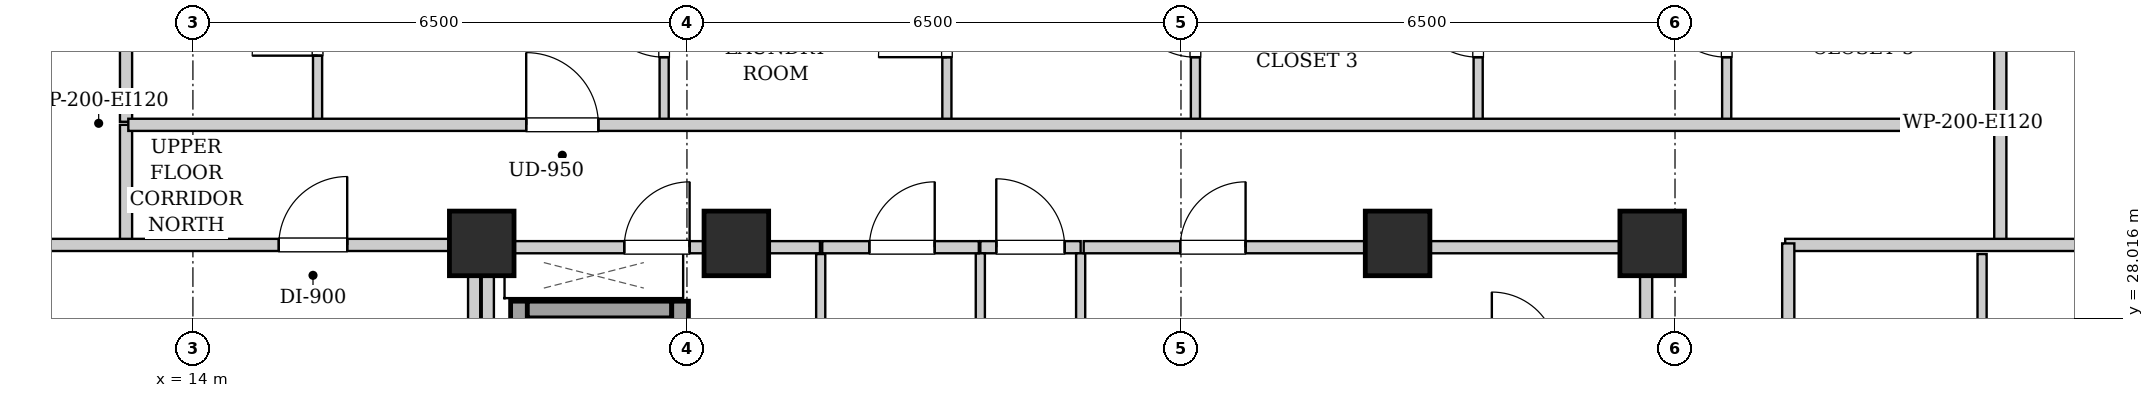
"""IFC4 building model, lengths in metres.
Left out: names, types, materials, properties, quantities, classifications, styles, units other than length and angle.
Written with IfcOpenShell. Run it as: python <this file> out.ifc"""

import sys

from ifc_helpers import new_model, si_unit, direction, frame, frame_2d, origin, origin_2d, place, context, subcontext, project, spatial, rectangle, extrude, element, fill, save


model = new_model("IFC4")
c1 = context("Model", 3, precision=1e-05, world=origin(), true_north=direction((0.0, 1.0)))
c2 = subcontext(c1, "Body", "Model", "MODEL_VIEW")
j1 = project(units=[si_unit("LENGTHUNIT", "METRE"), si_unit("PLANEANGLEUNIT", "RADIAN")], contexts=[c1])
p1 = place(None, origin())
s1 = spatial("IfcSite", under=j1, at=p1, CompositionType="ELEMENT")
p2 = place(p1, origin())
s2 = spatial("IfcBuilding", under=s1, at=p2, CompositionType="ELEMENT")
p3 = place(p2, frame((0.0, 0.0, 181.0)))
s3 = spatial("IfcBuildingStorey", under=s2, at=p3, CompositionType="ELEMENT", Elevation=181.0)
for number, where, z_axis, x_axis in (
    (1, (17.8, 29.0, 0.0), (0.0, 0.0, 1.0), (1.0, 0.0, 0.0)),
    (2, (21.15, 29.0, 0.0), (0.0, 0.0, 1.0), (1.0, 0.0, 0.0)),
    (3, (29.85, 29.0, 0.0), (0.0, 0.0, 1.0), (1.0, 0.0, 0.0)),
    (4, (33.2, 29.0, 0.0), (0.0, 0.0, 1.0), (1.0, 0.0, 0.0)),
):
    element("IfcColumn", number, at=place(p3, frame(where, z_axis=z_axis, x_axis=x_axis)), inside=s3, PredefinedType="COLUMN", context=c2, shape_type="SweptSolid", body=[
        extrude(rectangle(XDim=0.85, YDim=0.85, at=origin_2d()), origin(), (0.0, 0.0, 1.0), 3.3),
    ])
p4 = place(p3, frame((18.29, 24.1, 0.0), z_axis=(0.0, 0.0, 1.0), x_axis=(0.0, 1.0, 0.0)))
e5 = element("IfcWall", 5, at=p4, inside=s3, PredefinedType="SHEAR", context=c2, shape_type="SweptSolid", body=[
    extrude(rectangle(XDim=4.14, YDim=0.22, at=frame_2d((2.07, 0.0))), origin(), (0.0, 0.0, 1.0), 3.04),
])
p5 = place(p3, frame((18.4, 28.13, 0.0), z_axis=(0.0, 0.0, 1.0), x_axis=(1.0, 0.0, 0.0)))
e6 = element("IfcWall", 6, at=p5, inside=s3, PredefinedType="SHEAR", context=c2, shape_type="SweptSolid", body=[
    extrude(rectangle(XDim=1.9, YDim=0.22, at=frame_2d((0.95, 0.0))), origin(), (0.0, 0.0, 1.0), 3.04),
])
p6 = place(p3, frame((20.41, 26.06, 0.0), z_axis=(0.0, 0.0, 1.0), x_axis=(0.0, 1.0, 0.0)))
e7 = element("IfcWall", 7, at=p6, inside=s3, PredefinedType="SHEAR", context=c2, shape_type="SweptSolid", body=[
    extrude(rectangle(XDim=2.18, YDim=0.22, at=frame_2d((1.09, 0.0))), origin(), (0.0, 0.0, 1.0), 3.04),
])
p7 = place(p6, frame((0.54, 0.0, 0.0)))
e8 = element("IfcOpeningElement", 8, at=p7, cuts=e7, PredefinedType="OPENING", context=c2, shape_type="SweptSolid", body=[
    extrude(rectangle(XDim=1.1, YDim=2.15, at=frame_2d((0.55, 1.075))), frame((0.0, 0.12, 0.0), z_axis=(0.0, -1.0, 0.0), x_axis=(1.0, 0.0, 0.0)), (0.0, 0.0, 1.0), 0.24),
])
for number, where, z_axis, x_axis in (
    (9, (17.88, 24.12, 0.0), (0.0, 0.0, 1.0), (0.0, 1.0, 0.0)),
    (10, (33.12, 24.12, 0.0), (0.0, 0.0, 1.0), (0.0, 1.0, 0.0)),
):
    element("IfcWall", number, at=place(p3, frame(where, z_axis=z_axis, x_axis=x_axis)), inside=s3, PredefinedType="PARTITIONING", context=c2, shape_type="SweptSolid", body=[
        extrude(rectangle(XDim=4.76, YDim=0.16, at=frame_2d((2.38, 0.0))), origin(), (0.0, 0.0, 1.0), 3.04),
    ])
p8 = place(p3, frame((24.36, 28.95, 0.0), z_axis=(0.0, 0.0, 1.0), x_axis=(1.0, 0.0, 0.0)))
e11 = element("IfcWall", 11, at=p8, inside=s3, PredefinedType="PARTITIONING", context=c2, shape_type="SweptSolid", body=[
    extrude(rectangle(XDim=1.32, YDim=0.16, at=frame_2d((0.66, 0.0))), origin(), (0.0, 0.0, 1.0), 2.556),
])
p9 = place(p8, frame((0.21, 0.0, 0.0)))
e12 = element("IfcOpeningElement", 12, at=p9, cuts=e11, PredefinedType="OPENING", context=c2, shape_type="SweptSolid", body=[
    extrude(rectangle(XDim=0.9, YDim=2.05, at=frame_2d((0.45, 1.025))), frame((0.0, 0.09, 0.0), z_axis=(0.0, -1.0, 0.0), x_axis=(1.0, 0.0, 0.0)), (0.0, 0.0, 1.0), 0.18),
])
p10 = place(p3, frame((17.96, 28.95, 0.0), z_axis=(0.0, 0.0, 1.0), x_axis=(1.0, 0.0, 0.0)))
e13 = element("IfcWall", 13, at=p10, inside=s3, PredefinedType="PARTITIONING", context=c2, shape_type="SweptSolid", body=[
    extrude(rectangle(XDim=4.29, YDim=0.16, at=frame_2d((2.145, 0.0))), origin(), (0.0, 0.0, 1.0), 2.556),
])
p11 = place(p10, frame((1.715, 0.0, 0.0)))
e14 = element("IfcOpeningElement", 14, at=p11, cuts=e13, PredefinedType="OPENING", context=c2, shape_type="SweptSolid", body=[
    extrude(rectangle(XDim=0.86, YDim=2.05, at=frame_2d((0.43, 1.025))), frame((0.0, 0.09, 0.0), z_axis=(0.0, -1.0, 0.0), x_axis=(1.0, 0.0, 0.0)), (0.0, 0.0, 1.0), 0.18),
])
for number, where, z_axis, x_axis in (
    (15, (24.36, 25.0, 0.0), (0.0, 0.0, 1.0), (0.0, 1.0, 0.0)),
    (16, (25.68, 25.0, 0.0), (0.0, 0.0, 1.0), (0.0, 1.0, 0.0)),
):
    element("IfcWall", number, at=place(p3, frame(where, z_axis=z_axis, x_axis=x_axis)), inside=s3, PredefinedType="PARTITIONING", context=c2, shape_type="SweptSolid", body=[
        extrude(rectangle(XDim=3.87, YDim=0.12, at=frame_2d((1.935, 0.0))), origin(), (0.0, 0.0, 1.0), 3.04),
    ])
p12 = place(p3, frame((22.26, 25.0, 0.0), z_axis=(0.0, 0.0, 1.0), x_axis=(0.0, 1.0, 0.0)))
e17 = element("IfcWall", 17, at=p12, inside=s3, PredefinedType="PARTITIONING", context=c2, shape_type="SweptSolid", body=[
    extrude(rectangle(XDim=3.86, YDim=0.12, at=frame_2d((1.93, 0.0))), origin(), (0.0, 0.0, 1.0), 3.04),
])
p13 = place(p3, frame((22.28, 28.95, 0.0), z_axis=(0.0, 0.0, 1.0), x_axis=(1.0, 0.0, 0.0)))
e18 = element("IfcWall", 18, at=p13, inside=s3, PredefinedType="PARTITIONING", context=c2, shape_type="SweptSolid", body=[
    extrude(rectangle(XDim=2.06, YDim=0.16, at=frame_2d((1.03, 0.0))), origin(), (0.0, 0.0, 1.0), 2.556),
])
p14 = place(p13, frame((0.62, 0.0, 0.0)))
e19 = element("IfcOpeningElement", 19, at=p14, cuts=e18, PredefinedType="OPENING", context=c2, shape_type="SweptSolid", body=[
    extrude(rectangle(XDim=0.86, YDim=2.05, at=frame_2d((0.43, 1.025))), frame((0.0, 0.09, 0.0), z_axis=(0.0, -1.0, 0.0), x_axis=(1.0, 0.0, 0.0)), (0.0, 0.0, 1.0), 0.18),
])
p15 = place(p3, frame((25.72, 28.95, 0.0), z_axis=(0.0, 0.0, 1.0), x_axis=(1.0, 0.0, 0.0)))
e20 = element("IfcWall", 20, at=p15, inside=s3, PredefinedType="PARTITIONING", context=c2, shape_type="SweptSolid", body=[
    extrude(rectangle(XDim=7.32, YDim=0.16, at=frame_2d((3.66, 0.0))), origin(), (0.0, 0.0, 1.0), 2.556),
])
p16 = place(p15, frame((1.27, 0.0, 0.0)))
e21 = element("IfcOpeningElement", 21, at=p16, cuts=e20, PredefinedType="OPENING", context=c2, shape_type="SweptSolid", body=[
    extrude(rectangle(XDim=0.86, YDim=2.05, at=frame_2d((0.43, 1.025))), frame((0.0, 0.09, 0.0), z_axis=(0.0, -1.0, 0.0), x_axis=(1.0, 0.0, 0.0)), (0.0, 0.0, 1.0), 0.18),
])
for number, where, z_axis, x_axis in (
    (22, (13.12, 28.98, 0.0), (0.0, 0.0, 1.0), (0.0, 1.0, 0.0)),
    (23, (37.78, 28.98, 0.0), (0.0, 0.0, 1.0), (0.0, 1.0, 0.0)),
):
    element("IfcWall", number, at=place(p3, frame(where, z_axis=z_axis, x_axis=x_axis)), inside=s3, PredefinedType="PARTITIONING", context=c2, shape_type="SweptSolid", body=[
        extrude(rectangle(XDim=1.58, YDim=0.16, at=frame_2d((0.79, 0.0))), origin(), (0.0, 0.0, 1.0), 3.04),
    ])
p17 = place(p3, frame((10.88, 28.98, 0.0), z_axis=(0.0, 0.0, 1.0), x_axis=(1.0, 0.0, 0.0)))
e24 = element("IfcWall", 24, at=p17, inside=s3, PredefinedType="PARTITIONING", context=c2, shape_type="SweptSolid", body=[
    extrude(rectangle(XDim=6.88, YDim=0.16, at=frame_2d((3.44, 0.0))), origin(), (0.0, 0.0, 1.0), 2.556),
])
p18 = place(p17, frame((4.25, 0.0, 0.0)))
e25 = element("IfcOpeningElement", 25, at=p18, cuts=e24, PredefinedType="OPENING", context=c2, shape_type="SweptSolid", body=[
    extrude(rectangle(XDim=0.9, YDim=2.05, at=frame_2d((0.45, 1.025))), frame((0.0, 0.09, 0.0), z_axis=(0.0, -1.0, 0.0), x_axis=(1.0, 0.0, 0.0)), (0.0, 0.0, 1.0), 0.18),
])
p19 = place(p3, frame((34.95, 28.98, 0.0), z_axis=(0.0, 0.0, 1.0), x_axis=(1.0, 0.0, 0.0)))
e26 = element("IfcWall", 26, at=p19, inside=s3, PredefinedType="PARTITIONING", context=c2, shape_type="SweptSolid", body=[
    extrude(rectangle(XDim=5.07, YDim=0.16, at=frame_2d((2.535, 0.0))), origin(), (0.0, 0.0, 1.0), 2.556),
])
for number, where, z_axis, x_axis in (
    (27, (13.12, 30.6, 0.0), (0.0, 0.0, 1.0), (0.0, 1.0, 0.0)),
    (28, (37.78, 30.6, 0.0), (0.0, 0.0, 1.0), (0.0, 1.0, 0.0)),
):
    element("IfcWall", number, at=place(p3, frame(where, z_axis=z_axis, x_axis=x_axis)), inside=s3, PredefinedType="PARTITIONING", context=c2, shape_type="SweptSolid", body=[
        extrude(rectangle(XDim=2.66, YDim=0.16, at=frame_2d((1.33, 0.0))), origin(), (0.0, 0.0, 1.0), 3.04),
    ])
p20 = place(p3, frame((15.64, 30.6, 0.0), z_axis=(0.0, 0.0, 1.0), x_axis=(0.0, 1.0, 0.0)))
e29 = element("IfcWall", 29, at=p20, inside=s3, PredefinedType="PARTITIONING", context=c2, shape_type="SweptSolid", body=[
    extrude(rectangle(XDim=2.6, YDim=0.12, at=frame_2d((1.3, 0.0))), origin(), (0.0, 0.0, 1.0), 3.04),
])
p21 = place(p20, frame((0.87, 0.0, 0.0)))
e30 = element("IfcOpeningElement", 30, at=p21, cuts=e29, PredefinedType="OPENING", context=c2, shape_type="SweptSolid", body=[
    extrude(rectangle(XDim=0.86, YDim=2.05, at=frame_2d((0.43, 1.025))), frame((0.0, 0.07, 0.0), z_axis=(0.0, -1.0, 0.0), x_axis=(1.0, 0.0, 0.0)), (0.0, 0.0, 1.0), 0.14),
])
p22 = place(p3, frame((20.2, 30.6, 0.0), z_axis=(0.0, 0.0, 1.0), x_axis=(0.0, 1.0, 0.0)))
e31 = element("IfcWall", 31, at=p22, inside=s3, PredefinedType="PARTITIONING", context=c2, shape_type="SweptSolid", body=[
    extrude(rectangle(XDim=2.6, YDim=0.12, at=frame_2d((1.3, 0.0))), origin(), (0.0, 0.0, 1.0), 3.04),
])
p23 = place(p22, frame((0.85, 0.0, 0.0)))
e32 = element("IfcOpeningElement", 32, at=p23, cuts=e31, PredefinedType="OPENING", context=c2, shape_type="SweptSolid", body=[
    extrude(rectangle(XDim=0.9, YDim=2.05, at=frame_2d((0.45, 1.025))), frame((0.0, 0.07, 0.0), z_axis=(0.0, -1.0, 0.0), x_axis=(1.0, 0.0, 0.0)), (0.0, 0.0, 1.0), 0.14),
])
p24 = place(p3, frame((23.92, 30.6, 0.0), z_axis=(0.0, 0.0, 1.0), x_axis=(0.0, 1.0, 0.0)))
e33 = element("IfcWall", 33, at=p24, inside=s3, PredefinedType="PARTITIONING", context=c2, shape_type="SweptSolid", body=[
    extrude(rectangle(XDim=2.6, YDim=0.12, at=frame_2d((1.3, 0.0))), origin(), (0.0, 0.0, 1.0), 3.04),
])
p25 = place(p24, frame((0.85, 0.0, 0.0)))
e34 = element("IfcOpeningElement", 34, at=p25, cuts=e33, PredefinedType="OPENING", context=c2, shape_type="SweptSolid", body=[
    extrude(rectangle(XDim=0.9, YDim=2.05, at=frame_2d((0.45, 1.025))), frame((0.0, 0.07, 0.0), z_axis=(0.0, -1.0, 0.0), x_axis=(1.0, 0.0, 0.0)), (0.0, 0.0, 1.0), 0.14),
])
p26 = place(p3, frame((27.19, 30.6, 0.0), z_axis=(0.0, 0.0, 1.0), x_axis=(0.0, 1.0, 0.0)))
e35 = element("IfcWall", 35, at=p26, inside=s3, PredefinedType="PARTITIONING", context=c2, shape_type="SweptSolid", body=[
    extrude(rectangle(XDim=2.6, YDim=0.12, at=frame_2d((1.3, 0.0))), origin(), (0.0, 0.0, 1.0), 3.04),
])
p27 = place(p26, frame((0.85, 0.0, 0.0)))
e36 = element("IfcOpeningElement", 36, at=p27, cuts=e35, PredefinedType="OPENING", context=c2, shape_type="SweptSolid", body=[
    extrude(rectangle(XDim=0.9, YDim=2.05, at=frame_2d((0.45, 1.025))), frame((0.0, 0.07, 0.0), z_axis=(0.0, -1.0, 0.0), x_axis=(1.0, 0.0, 0.0)), (0.0, 0.0, 1.0), 0.14),
])
p28 = place(p3, frame((30.91, 30.6, 0.0), z_axis=(0.0, 0.0, 1.0), x_axis=(0.0, 1.0, 0.0)))
e37 = element("IfcWall", 37, at=p28, inside=s3, PredefinedType="PARTITIONING", context=c2, shape_type="SweptSolid", body=[
    extrude(rectangle(XDim=2.6, YDim=0.12, at=frame_2d((1.3, 0.0))), origin(), (0.0, 0.0, 1.0), 3.04),
])
p29 = place(p28, frame((0.85, 0.0, 0.0)))
e38 = element("IfcOpeningElement", 38, at=p29, cuts=e37, PredefinedType="OPENING", context=c2, shape_type="SweptSolid", body=[
    extrude(rectangle(XDim=0.9, YDim=2.05, at=frame_2d((0.45, 1.025))), frame((0.0, 0.07, 0.0), z_axis=(0.0, -1.0, 0.0), x_axis=(1.0, 0.0, 0.0)), (0.0, 0.0, 1.0), 0.14),
])
p30 = place(p3, frame((34.18, 30.6, 0.0), z_axis=(0.0, 0.0, 1.0), x_axis=(0.0, 1.0, 0.0)))
e39 = element("IfcWall", 39, at=p30, inside=s3, PredefinedType="PARTITIONING", context=c2, shape_type="SweptSolid", body=[
    extrude(rectangle(XDim=2.6, YDim=0.12, at=frame_2d((1.3, 0.0))), origin(), (0.0, 0.0, 1.0), 3.04),
])
p31 = place(p30, frame((0.85, 0.0, 0.0)))
e40 = element("IfcOpeningElement", 40, at=p31, cuts=e39, PredefinedType="OPENING", context=c2, shape_type="SweptSolid", body=[
    extrude(rectangle(XDim=0.9, YDim=2.05, at=frame_2d((0.45, 1.025))), frame((0.0, 0.07, 0.0), z_axis=(0.0, -1.0, 0.0), x_axis=(1.0, 0.0, 0.0)), (0.0, 0.0, 1.0), 0.14),
])
p32 = place(p3, frame((37.54, 24.552, 0.0), z_axis=(0.0, 0.0, 1.0), x_axis=(0.0, 1.0, 0.0)))
e41 = element("IfcWall", 41, at=p32, inside=s3, PredefinedType="PARTITIONING", context=c2, shape_type="SweptSolid", body=[
    extrude(rectangle(XDim=4.308, YDim=0.12, at=frame_2d((2.154, 0.0))), origin(), (0.0, 0.0, 1.0), 3.04),
])
p33 = place(p32, frame((1.704, 0.0, 0.0)))
e42 = element("IfcOpeningElement", 42, at=p33, cuts=e41, PredefinedType="OPENING", context=c2, shape_type="SweptSolid", body=[
    extrude(rectangle(XDim=0.9, YDim=2.05, at=frame_2d((0.45, 1.025))), frame((0.0, 0.07, 0.0), z_axis=(0.0, -1.0, 0.0), x_axis=(1.0, 0.0, 0.0)), (0.0, 0.0, 1.0), 0.14),
])
p34 = place(p3, frame((13.15, 30.56, 0.0), z_axis=(0.0, 0.0, 1.0), x_axis=(1.0, 0.0, 0.0)))
e43 = element("IfcWall", 43, at=p34, inside=s3, PredefinedType="PARTITIONING", context=c2, shape_type="SweptSolid", body=[
    extrude(rectangle(XDim=24.6, YDim=0.16, at=frame_2d((12.3, 0.0))), origin(), (0.0, 0.0, 1.0), 3.04),
])
p35 = place(p34, frame((5.235, 0.0, 0.0)))
e44 = element("IfcOpeningElement", 44, at=p35, cuts=e43, PredefinedType="OPENING", context=c2, shape_type="SweptSolid", body=[
    extrude(rectangle(XDim=0.95, YDim=2.1, at=frame_2d((0.475, 1.05))), frame((0.0, 0.09, 0.0), z_axis=(0.0, -1.0, 0.0), x_axis=(1.0, 0.0, 0.0)), (0.0, 0.0, 1.0), 0.18),
])
p36 = place(p3, frame((17.7, 15.02, 0.0), z_axis=(0.0, 0.0, 1.0), x_axis=(0.0, 1.0, 0.0)))
e45 = element("IfcWall", 45, at=p36, inside=s3, PredefinedType="PARTITIONING", context=c2, shape_type="SweptSolid", body=[
    extrude(rectangle(XDim=13.98, YDim=0.16, at=frame_2d((6.99, 0.0))), origin(), (0.0, 0.0, 1.0), 3.04),
])
p37 = place(p3, frame((34.99, 15.07, 0.0), z_axis=(0.0, 0.0, 1.0), x_axis=(0.0, 1.0, 0.0)))
e46 = element("IfcWall", 46, at=p37, inside=s3, PredefinedType="PARTITIONING", context=c2, shape_type="SweptSolid", body=[
    extrude(rectangle(XDim=13.93, YDim=0.16, at=frame_2d((6.965, 0.0))), origin(), (0.0, 0.0, 1.0), 3.04),
])
p38 = place(p37, frame((4.385, 0.0, 0.0)))
e47 = element("IfcOpeningElement", 47, at=p38, cuts=e46, PredefinedType="OPENING", context=c2, shape_type="SweptSolid", body=[
    extrude(rectangle(XDim=0.95, YDim=2.1, at=frame_2d((0.475, 1.05))), frame((0.0, 0.09, 0.0), z_axis=(0.0, -1.0, 0.0), x_axis=(1.0, 0.0, 0.0)), (0.0, 0.0, 1.0), 0.18),
])
p39 = place(p9, origin())
e48 = element("IfcDoor", 48, at=p39, inside=s3, OperationType="SINGLE_SWING_LEFT", PredefinedType="DOOR", context=c2, shape_type="SweptSolid", body=[
    extrude(rectangle(XDim=0.9, YDim=2.05, at=frame_2d((0.45, 1.025))), frame((0.0, 0.025, 0.0), z_axis=(0.0, -1.0, 0.0), x_axis=(1.0, 0.0, 0.0)), (0.0, 0.0, 1.0), 0.05),
])
fill(e12, e48)
p40 = place(p11, origin())
e49 = element("IfcDoor", 49, at=p40, inside=s3, OperationType="SINGLE_SWING_RIGHT", PredefinedType="DOOR", context=c2, shape_type="SweptSolid", body=[
    extrude(rectangle(XDim=0.86, YDim=2.05, at=frame_2d((0.43, 1.025))), frame((0.0, 0.025, 0.0), z_axis=(0.0, -1.0, 0.0), x_axis=(1.0, 0.0, 0.0)), (0.0, 0.0, 1.0), 0.05),
])
fill(e14, e49)
p41 = place(p14, origin())
e50 = element("IfcDoor", 50, at=p41, inside=s3, OperationType="SINGLE_SWING_RIGHT", PredefinedType="DOOR", context=c2, shape_type="SweptSolid", body=[
    extrude(rectangle(XDim=0.86, YDim=2.05, at=frame_2d((0.43, 1.025))), frame((0.0, 0.025, 0.0), z_axis=(0.0, -1.0, 0.0), x_axis=(1.0, 0.0, 0.0)), (0.0, 0.0, 1.0), 0.05),
])
fill(e19, e50)
p42 = place(p16, origin())
e51 = element("IfcDoor", 51, at=p42, inside=s3, OperationType="SINGLE_SWING_RIGHT", PredefinedType="DOOR", context=c2, shape_type="SweptSolid", body=[
    extrude(rectangle(XDim=0.86, YDim=2.05, at=frame_2d((0.43, 1.025))), frame((0.0, 0.025, 0.0), z_axis=(0.0, -1.0, 0.0), x_axis=(1.0, 0.0, 0.0)), (0.0, 0.0, 1.0), 0.05),
])
fill(e21, e51)
p43 = place(p18, origin())
e52 = element("IfcDoor", 52, at=p43, inside=s3, OperationType="SINGLE_SWING_RIGHT", PredefinedType="DOOR", context=c2, shape_type="SweptSolid", body=[
    extrude(rectangle(XDim=0.9, YDim=2.05, at=frame_2d((0.45, 1.025))), frame((0.0, 0.025, 0.0), z_axis=(0.0, -1.0, 0.0), x_axis=(1.0, 0.0, 0.0)), (0.0, 0.0, 1.0), 0.05),
])
fill(e25, e52)
p44 = place(p21, origin())
e53 = element("IfcDoor", 53, at=p44, inside=s3, OperationType="SINGLE_SWING_LEFT", PredefinedType="DOOR", context=c2, shape_type="SweptSolid", body=[
    extrude(rectangle(XDim=0.86, YDim=2.05, at=frame_2d((0.43, 1.025))), frame((0.0, 0.025, 0.0), z_axis=(0.0, -1.0, 0.0), x_axis=(1.0, 0.0, 0.0)), (0.0, 0.0, 1.0), 0.05),
])
fill(e30, e53)
p45 = place(p23, origin())
e54 = element("IfcDoor", 54, at=p45, inside=s3, OperationType="SINGLE_SWING_RIGHT", PredefinedType="DOOR", context=c2, shape_type="SweptSolid", body=[
    extrude(rectangle(XDim=0.9, YDim=2.05, at=frame_2d((0.45, 1.025))), frame((0.0, 0.025, 0.0), z_axis=(0.0, -1.0, 0.0), x_axis=(1.0, 0.0, 0.0)), (0.0, 0.0, 1.0), 0.05),
])
fill(e32, e54)
p46 = place(p25, origin())
e55 = element("IfcDoor", 55, at=p46, inside=s3, OperationType="SINGLE_SWING_LEFT", PredefinedType="DOOR", context=c2, shape_type="SweptSolid", body=[
    extrude(rectangle(XDim=0.9, YDim=2.05, at=frame_2d((0.45, 1.025))), frame((0.0, 0.025, 0.0), z_axis=(0.0, -1.0, 0.0), x_axis=(1.0, 0.0, 0.0)), (0.0, 0.0, 1.0), 0.05),
])
fill(e34, e55)
p47 = place(p27, origin())
e56 = element("IfcDoor", 56, at=p47, inside=s3, OperationType="SINGLE_SWING_RIGHT", PredefinedType="DOOR", context=c2, shape_type="SweptSolid", body=[
    extrude(rectangle(XDim=0.9, YDim=2.05, at=frame_2d((0.45, 1.025))), frame((0.0, 0.025, 0.0), z_axis=(0.0, -1.0, 0.0), x_axis=(1.0, 0.0, 0.0)), (0.0, 0.0, 1.0), 0.05),
])
fill(e36, e56)
p48 = place(p29, origin())
e57 = element("IfcDoor", 57, at=p48, inside=s3, OperationType="SINGLE_SWING_RIGHT", PredefinedType="DOOR", context=c2, shape_type="SweptSolid", body=[
    extrude(rectangle(XDim=0.9, YDim=2.05, at=frame_2d((0.45, 1.025))), frame((0.0, 0.025, 0.0), z_axis=(0.0, -1.0, 0.0), x_axis=(1.0, 0.0, 0.0)), (0.0, 0.0, 1.0), 0.05),
])
fill(e38, e57)
p49 = place(p31, origin())
e58 = element("IfcDoor", 58, at=p49, inside=s3, OperationType="SINGLE_SWING_RIGHT", PredefinedType="DOOR", context=c2, shape_type="SweptSolid", body=[
    extrude(rectangle(XDim=0.9, YDim=2.05, at=frame_2d((0.45, 1.025))), frame((0.0, 0.025, 0.0), z_axis=(0.0, -1.0, 0.0), x_axis=(1.0, 0.0, 0.0)), (0.0, 0.0, 1.0), 0.05),
])
fill(e40, e58)
p50 = place(p35, origin())
e59 = element("IfcDoor", 59, at=p50, inside=s3, OperationType="SINGLE_SWING_LEFT", PredefinedType="DOOR", context=c2, shape_type="SweptSolid", body=[
    extrude(rectangle(XDim=0.95, YDim=2.1, at=frame_2d((0.475, 1.05))), frame((0.0, 0.025, 0.0), z_axis=(0.0, -1.0, 0.0), x_axis=(1.0, 0.0, 0.0)), (0.0, 0.0, 1.0), 0.05),
])
fill(e44, e59)
save(model, sys.argv[1])
